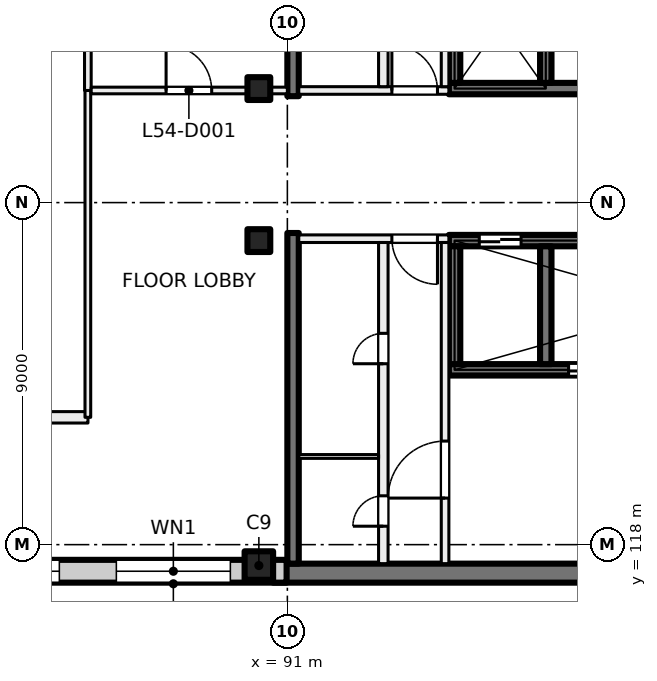
"""IFC4 building model, lengths in metres.
Left out: names, types, materials, properties, quantities, classifications, styles, units other than length and angle.
Written with IfcOpenShell. Run it as: python <this file> out.ifc"""

import sys

from ifc_helpers import new_model, si_unit, direction, frame, frame_2d, origin, origin_2d, place, context, subcontext, project, spatial, rectangle, extrude, element, fill, save


model = new_model("IFC4")
c1 = context("Model", 3, precision=1e-05, world=origin(), true_north=direction((0.0, 1.0)))
c2 = subcontext(c1, "Body", "Model", "MODEL_VIEW")
j1 = project(units=[si_unit("LENGTHUNIT", "METRE"), si_unit("PLANEANGLEUNIT", "RADIAN")], contexts=[c1])
p1 = place(None, origin())
s1 = spatial("IfcSite", under=j1, at=p1, CompositionType="ELEMENT")
p2 = place(p1, origin())
s2 = spatial("IfcBuilding", under=s1, at=p2, CompositionType="ELEMENT")
p3 = place(p2, frame((0.0, 0.0, 228.0)))
s3 = spatial("IfcBuildingStorey", under=s2, at=p3, CompositionType="ELEMENT", Elevation=228.0)
for number, where, z_axis, x_axis in (
    (1, (90.25, 130.0, 0.0), (0.0, 0.0, 1.0), (1.0, 0.0, 0.0)),
    (2, (90.25, 126.0, 0.0), (0.0, 0.0, 1.0), (1.0, 0.0, 0.0)),
):
    element("IfcColumn", number, at=place(p3, frame(where, z_axis=z_axis, x_axis=x_axis)), inside=s3, PredefinedType="COLUMN", context=c2, shape_type="SweptSolid", body=[
        extrude(rectangle(XDim=0.6, YDim=0.6, at=origin_2d()), origin(), (0.0, 0.0, 1.0), 4.0),
    ])
p4 = place(p3, frame((90.25, 117.45, 0.0), z_axis=(0.0, 0.0, 1.0), x_axis=(1.0, 0.0, 0.0)))
e3 = element("IfcColumn", 3, at=p4, inside=s3, PredefinedType="COLUMN", context=c2, shape_type="SweptSolid", body=[
    extrude(rectangle(XDim=0.75, YDim=0.75, at=origin_2d()), origin(), (0.0, 0.0, 1.0), 4.0),
])
p5 = place(p3, frame((99.6, 117.25, 0.0), z_axis=(0.0, 0.0, 1.0), x_axis=(-1.0, 0.0, 0.0)))
e4 = element("IfcWall", 4, at=p5, inside=s3, PredefinedType="SHEAR", context=c2, shape_type="SweptSolid", body=[
    extrude(rectangle(XDim=8.975, YDim=0.5, at=frame_2d((4.488, 0.0))), origin(), (0.0, 0.0, 1.0), 4.0),
])
p6 = place(p3, frame((107.5, 130.0, 0.0), z_axis=(0.0, 0.0, 1.0), x_axis=(-1.0, 0.0, 0.0)))
e5 = element("IfcWall", 5, at=p6, inside=s3, PredefinedType="SHEAR", context=c2, shape_type="SweptSolid", body=[
    extrude(rectangle(XDim=12.25, YDim=0.3, at=frame_2d((6.125, 0.0))), origin(), (0.0, 0.0, 1.0), 4.0),
])
p7 = place(p6, frame((0.9, 0.0, 0.0)))
e6 = element("IfcOpeningElement", 6, at=p7, cuts=e5, PredefinedType="OPENING", context=c2, shape_type="SweptSolid", body=[
    extrude(rectangle(XDim=0.8, YDim=2.1, at=frame_2d((0.4, 1.05))), frame((0.0, 0.16, 0.0), z_axis=(0.0, -1.0, 0.0), x_axis=(1.0, 0.0, 0.0)), (0.0, 0.0, 1.0), 0.32),
])
p8 = place(p6, frame((5.7, 0.0, 0.0)))
e7 = element("IfcOpeningElement", 7, at=p8, cuts=e5, PredefinedType="OPENING", context=c2, shape_type="SweptSolid", body=[
    extrude(rectangle(XDim=0.8, YDim=2.1, at=frame_2d((0.4, 1.05))), frame((0.0, 0.16, 0.0), z_axis=(0.0, -1.0, 0.0), x_axis=(1.0, 0.0, 0.0)), (0.0, 0.0, 1.0), 0.32),
])
for number, where, z_axis, x_axis in (
    (8, (97.8, 133.25, 0.0), (0.0, 0.0, 1.0), (0.0, -1.0, 0.0)),
    (9, (95.4, 133.25, 0.0), (0.0, 0.0, 1.0), (0.0, -1.0, 0.0)),
):
    element("IfcWall", number, at=place(p3, frame(where, z_axis=z_axis, x_axis=x_axis)), inside=s3, PredefinedType="SHEAR", context=c2, shape_type="SweptSolid", body=[
        extrude(rectangle(XDim=3.1, YDim=0.3, at=frame_2d((1.55, 0.0))), origin(), (0.0, 0.0, 1.0), 4.0),
    ])
p9 = place(p3, frame((107.5, 126.0, 0.0), z_axis=(0.0, 0.0, 1.0), x_axis=(-1.0, 0.0, 0.0)))
e10 = element("IfcWall", 10, at=p9, inside=s3, PredefinedType="SHEAR", context=c2, shape_type="SweptSolid", body=[
    extrude(rectangle(XDim=12.25, YDim=0.3, at=frame_2d((6.125, 0.0))), origin(), (0.0, 0.0, 1.0), 4.0),
])
p10 = place(p9, frame((0.75, 0.0, 0.0)))
e11 = element("IfcOpeningElement", 11, at=p10, cuts=e10, PredefinedType="OPENING", context=c2, shape_type="SweptSolid", body=[
    extrude(rectangle(XDim=1.1, YDim=2.1, at=frame_2d((0.55, 1.05))), frame((0.0, 0.16, 0.0), z_axis=(0.0, -1.0, 0.0), x_axis=(1.0, 0.0, 0.0)), (0.0, 0.0, 1.0), 0.32),
])
p11 = place(p9, frame((3.15, 0.0, 0.0)))
e12 = element("IfcOpeningElement", 12, at=p11, cuts=e10, PredefinedType="OPENING", context=c2, shape_type="SweptSolid", body=[
    extrude(rectangle(XDim=1.1, YDim=2.1, at=frame_2d((0.55, 1.05))), frame((0.0, 0.16, 0.0), z_axis=(0.0, -1.0, 0.0), x_axis=(1.0, 0.0, 0.0)), (0.0, 0.0, 1.0), 0.32),
])
p12 = place(p9, frame((5.55, 0.0, 0.0)))
e13 = element("IfcOpeningElement", 13, at=p12, cuts=e10, PredefinedType="OPENING", context=c2, shape_type="SweptSolid", body=[
    extrude(rectangle(XDim=1.1, YDim=2.1, at=frame_2d((0.55, 1.05))), frame((0.0, 0.16, 0.0), z_axis=(0.0, -1.0, 0.0), x_axis=(1.0, 0.0, 0.0)), (0.0, 0.0, 1.0), 0.32),
])
p13 = place(p9, frame((10.35, 0.0, 0.0)))
e14 = element("IfcOpeningElement", 14, at=p13, cuts=e10, PredefinedType="OPENING", context=c2, shape_type="SweptSolid", body=[
    extrude(rectangle(XDim=1.1, YDim=2.1, at=frame_2d((0.55, 1.05))), frame((0.0, 0.16, 0.0), z_axis=(0.0, -1.0, 0.0), x_axis=(1.0, 0.0, 0.0)), (0.0, 0.0, 1.0), 0.32),
])
p14 = place(p3, frame((107.5, 122.6, 0.0), z_axis=(0.0, 0.0, 1.0), x_axis=(-1.0, 0.0, 0.0)))
e15 = element("IfcWall", 15, at=p14, inside=s3, PredefinedType="SHEAR", context=c2, shape_type="SweptSolid", body=[
    extrude(rectangle(XDim=12.25, YDim=0.3, at=frame_2d((6.125, 0.0))), origin(), (0.0, 0.0, 1.0), 4.0),
])
p15 = place(p14, frame((8.0, 0.0, 0.0)))
e16 = element("IfcOpeningElement", 16, at=p15, cuts=e15, PredefinedType="OPENING", context=c2, shape_type="SweptSolid", body=[
    extrude(rectangle(XDim=1.1, YDim=2.1, at=frame_2d((0.55, 1.05))), frame((0.0, 0.16, 0.0), z_axis=(0.0, -1.0, 0.0), x_axis=(1.0, 0.0, 0.0)), (0.0, 0.0, 1.0), 0.32),
])
for number, where, z_axis, x_axis in (
    (17, (97.8, 125.85, 0.0), (0.0, 0.0, 1.0), (0.0, -1.0, 0.0)),
    (18, (95.4, 125.85, 0.0), (0.0, 0.0, 1.0), (0.0, -1.0, 0.0)),
):
    element("IfcWall", number, at=place(p3, frame(where, z_axis=z_axis, x_axis=x_axis)), inside=s3, PredefinedType="SHEAR", context=c2, shape_type="SweptSolid", body=[
        extrude(rectangle(XDim=3.1, YDim=0.3, at=frame_2d((1.55, 0.0))), origin(), (0.0, 0.0, 1.0), 4.0),
    ])
for number, where, z_axis, x_axis in (
    (19, (91.15, 138.5, 0.0), (0.0, 0.0, 1.0), (0.0, -1.0, 0.0)),
    (20, (91.15, 126.2, 0.0), (0.0, 0.0, 1.0), (0.0, -1.0, 0.0)),
):
    element("IfcWall", number, at=place(p3, frame(where, z_axis=z_axis, x_axis=x_axis)), inside=s3, PredefinedType="SHEAR", context=c2, shape_type="SweptSolid", body=[
        extrude(rectangle(XDim=8.7, YDim=0.3, at=frame_2d((4.35, 0.0))), origin(), (0.0, 0.0, 1.0), 4.0),
    ])
p16 = place(p3, frame((90.98, 117.3, 0.0), z_axis=(0.0, 0.0, 1.0), x_axis=(-1.0, 0.0, 0.0)))
e21 = element("IfcWall", 21, at=p16, inside=s3, PredefinedType="SOLIDWALL", context=c2, shape_type="SweptSolid", body=[
    extrude(rectangle(XDim=33.745, YDim=0.6, at=frame_2d((16.873, 0.0))), origin(), (0.0, 0.0, 1.0), 3.625),
])
p17 = place(p16, frame((1.48, 0.0, 0.9)))
e22 = element("IfcOpeningElement", 22, at=p17, cuts=e21, PredefinedType="OPENING", context=c2, shape_type="SweptSolid", body=[
    extrude(rectangle(XDim=3.0, YDim=2.4, at=frame_2d((1.5, 1.2))), frame((0.0, 0.31, 0.0), z_axis=(0.0, -1.0, 0.0), x_axis=(1.0, 0.0, 0.0)), (0.0, 0.0, 1.0), 0.62),
])
p18 = place(p16, frame((5.98, 0.0, 0.9)))
e23 = element("IfcOpeningElement", 23, at=p18, cuts=e21, PredefinedType="OPENING", context=c2, shape_type="SweptSolid", body=[
    extrude(rectangle(XDim=3.0, YDim=2.4, at=frame_2d((1.5, 1.2))), frame((0.0, 0.31, 0.0), z_axis=(0.0, -1.0, 0.0), x_axis=(1.0, 0.0, 0.0)), (0.0, 0.0, 1.0), 0.62),
])
p19 = place(p16, frame((10.48, 0.0, 0.9)))
e24 = element("IfcOpeningElement", 24, at=p19, cuts=e21, PredefinedType="OPENING", context=c2, shape_type="SweptSolid", body=[
    extrude(rectangle(XDim=3.0, YDim=2.4, at=frame_2d((1.5, 1.2))), frame((0.0, 0.31, 0.0), z_axis=(0.0, -1.0, 0.0), x_axis=(1.0, 0.0, 0.0)), (0.0, 0.0, 1.0), 0.62),
])
p20 = place(p16, frame((14.98, 0.0, 0.9)))
e25 = element("IfcOpeningElement", 25, at=p20, cuts=e21, PredefinedType="OPENING", context=c2, shape_type="SweptSolid", body=[
    extrude(rectangle(XDim=3.0, YDim=2.4, at=frame_2d((1.5, 1.2))), frame((0.0, 0.31, 0.0), z_axis=(0.0, -1.0, 0.0), x_axis=(1.0, 0.0, 0.0)), (0.0, 0.0, 1.0), 0.62),
])
p21 = place(p16, frame((19.48, 0.0, 0.9)))
e26 = element("IfcOpeningElement", 26, at=p21, cuts=e21, PredefinedType="OPENING", context=c2, shape_type="SweptSolid", body=[
    extrude(rectangle(XDim=3.0, YDim=2.4, at=frame_2d((1.5, 1.2))), frame((0.0, 0.31, 0.0), z_axis=(0.0, -1.0, 0.0), x_axis=(1.0, 0.0, 0.0)), (0.0, 0.0, 1.0), 0.62),
])
p22 = place(p16, frame((24.58, 0.0, 0.0)))
e27 = element("IfcOpeningElement", 27, at=p22, cuts=e21, PredefinedType="OPENING", context=c2, shape_type="SweptSolid", body=[
    extrude(rectangle(XDim=1.8, YDim=2.4, at=frame_2d((0.9, 1.2))), frame((0.0, 0.31, 0.0), z_axis=(0.0, -1.0, 0.0), x_axis=(1.0, 0.0, 0.0)), (0.0, 0.0, 1.0), 0.62),
])
p23 = place(p16, frame((28.48, 0.0, 0.9)))
e28 = element("IfcOpeningElement", 28, at=p23, cuts=e21, PredefinedType="OPENING", context=c2, shape_type="SweptSolid", body=[
    extrude(rectangle(XDim=3.0, YDim=2.4, at=frame_2d((1.5, 1.2))), frame((0.0, 0.31, 0.0), z_axis=(0.0, -1.0, 0.0), x_axis=(1.0, 0.0, 0.0)), (0.0, 0.0, 1.0), 0.62),
])
p24 = place(p3, frame((95.25, 126.05, 0.0), z_axis=(0.0, 0.0, 1.0), x_axis=(-1.0, 0.0, 0.0)))
e29 = element("IfcWall", 29, at=p24, inside=s3, PredefinedType="PARTITIONING", context=c2, shape_type="SweptSolid", body=[
    extrude(rectangle(XDim=3.95, YDim=0.2, at=frame_2d((1.975, 0.0))), origin(), (0.0, 0.0, 1.0), 3.625),
])
p25 = place(p24, frame((0.3, 0.0, 0.0)))
e30 = element("IfcOpeningElement", 30, at=p25, cuts=e29, PredefinedType="OPENING", context=c2, shape_type="SweptSolid", body=[
    extrude(rectangle(XDim=1.2, YDim=2.1, at=frame_2d((0.6, 1.05))), frame((0.0, 0.11, 0.0), z_axis=(0.0, -1.0, 0.0), x_axis=(1.0, 0.0, 0.0)), (0.0, 0.0, 1.0), 0.22),
])
p26 = place(p3, frame((95.15, 117.5, 0.0), z_axis=(0.0, 0.0, 1.0), x_axis=(0.0, 1.0, 0.0)))
e31 = element("IfcWall", 31, at=p26, inside=s3, PredefinedType="PARTITIONING", context=c2, shape_type="SweptSolid", body=[
    extrude(rectangle(XDim=8.45, YDim=0.2, at=frame_2d((4.225, 0.0))), origin(), (0.0, 0.0, 1.0), 3.625),
])
p27 = place(p26, frame((1.725, 0.0, 0.0)))
e32 = element("IfcOpeningElement", 32, at=p27, cuts=e31, PredefinedType="OPENING", context=c2, shape_type="SweptSolid", body=[
    extrude(rectangle(XDim=1.5, YDim=2.1, at=frame_2d((0.75, 1.05))), frame((0.0, 0.11, 0.0), z_axis=(0.0, -1.0, 0.0), x_axis=(1.0, 0.0, 0.0)), (0.0, 0.0, 1.0), 0.22),
])
p28 = place(p3, frame((93.525, 117.5, 0.0), z_axis=(0.0, 0.0, 1.0), x_axis=(0.0, 1.0, 0.0)))
e33 = element("IfcWall", 33, at=p28, inside=s3, PredefinedType="PARTITIONING", context=c2, shape_type="SweptSolid", body=[
    extrude(rectangle(XDim=8.45, YDim=0.25, at=frame_2d((4.225, 0.0))), origin(), (0.0, 0.0, 1.0), 3.625),
])
p29 = place(p28, frame((5.26, 0.0, 0.0)))
e34 = element("IfcOpeningElement", 34, at=p29, cuts=e33, PredefinedType="OPENING", context=c2, shape_type="SweptSolid", body=[
    extrude(rectangle(XDim=0.8, YDim=2.1, at=frame_2d((0.4, 1.05))), frame((0.0, 0.135, 0.0), z_axis=(0.0, -1.0, 0.0), x_axis=(1.0, 0.0, 0.0)), (0.0, 0.0, 1.0), 0.27),
])
p30 = place(p28, frame((0.985, 0.0, 0.0)))
e35 = element("IfcOpeningElement", 35, at=p30, cuts=e33, PredefinedType="OPENING", context=c2, shape_type="SweptSolid", body=[
    extrude(rectangle(XDim=0.8, YDim=2.1, at=frame_2d((0.4, 1.05))), frame((0.0, 0.135, 0.0), z_axis=(0.0, -1.0, 0.0), x_axis=(1.0, 0.0, 0.0)), (0.0, 0.0, 1.0), 0.27),
])
p31 = place(p3, frame((93.4, 120.32, 0.0), z_axis=(0.0, 0.0, 1.0), x_axis=(-1.0, 0.0, 0.0)))
e36 = element("IfcWall", 36, at=p31, inside=s3, PredefinedType="PARTITIONING", context=c2, shape_type="SweptSolid", body=[
    extrude(rectangle(XDim=2.1, YDim=0.1, at=frame_2d((1.05, 0.0))), origin(), (0.0, 0.0, 1.0), 3.625),
])
p32 = place(p3, frame((91.3, 129.95, 0.0), z_axis=(0.0, 0.0, 1.0), x_axis=(1.0, 0.0, 0.0)))
e37 = element("IfcWall", 37, at=p32, inside=s3, PredefinedType="PARTITIONING", context=c2, shape_type="SweptSolid", body=[
    extrude(rectangle(XDim=3.95, YDim=0.2, at=frame_2d((1.975, 0.0))), origin(), (0.0, 0.0, 1.0), 3.625),
])
p33 = place(p32, frame((2.45, 0.0, 0.0)))
e38 = element("IfcOpeningElement", 38, at=p33, cuts=e37, PredefinedType="OPENING", context=c2, shape_type="SweptSolid", body=[
    extrude(rectangle(XDim=1.2, YDim=2.1, at=frame_2d((0.6, 1.05))), frame((0.0, 0.11, 0.0), z_axis=(0.0, -1.0, 0.0), x_axis=(1.0, 0.0, 0.0)), (0.0, 0.0, 1.0), 0.22),
])
p34 = place(p3, frame((95.15, 130.05, 0.0), z_axis=(0.0, 0.0, 1.0), x_axis=(0.0, 1.0, 0.0)))
e39 = element("IfcWall", 39, at=p34, inside=s3, PredefinedType="PARTITIONING", context=c2, shape_type="SweptSolid", body=[
    extrude(rectangle(XDim=8.45, YDim=0.2, at=frame_2d((4.225, 0.0))), origin(), (0.0, 0.0, 1.0), 3.625),
])
p35 = place(p34, frame((5.225, 0.0, 0.0)))
e40 = element("IfcOpeningElement", 40, at=p35, cuts=e39, PredefinedType="OPENING", context=c2, shape_type="SweptSolid", body=[
    extrude(rectangle(XDim=1.5, YDim=2.1, at=frame_2d((0.75, 1.05))), frame((0.0, 0.11, 0.0), z_axis=(0.0, -1.0, 0.0), x_axis=(1.0, 0.0, 0.0)), (0.0, 0.0, 1.0), 0.22),
])
p36 = place(p3, frame((93.525, 130.05, 0.0), z_axis=(0.0, 0.0, 1.0), x_axis=(0.0, 1.0, 0.0)))
e41 = element("IfcWall", 41, at=p36, inside=s3, PredefinedType="PARTITIONING", context=c2, shape_type="SweptSolid", body=[
    extrude(rectangle(XDim=8.45, YDim=0.25, at=frame_2d((4.225, 0.0))), origin(), (0.0, 0.0, 1.0), 3.625),
])
p37 = place(p36, frame((1.69, 0.0, 0.0)))
e42 = element("IfcOpeningElement", 42, at=p37, cuts=e41, PredefinedType="OPENING", context=c2, shape_type="SweptSolid", body=[
    extrude(rectangle(XDim=0.8, YDim=2.1, at=frame_2d((0.4, 1.05))), frame((0.0, 0.135, 0.0), z_axis=(0.0, -1.0, 0.0), x_axis=(1.0, 0.0, 0.0)), (0.0, 0.0, 1.0), 0.27),
])
p38 = place(p36, frame((5.965, 0.0, 0.0)))
e43 = element("IfcOpeningElement", 43, at=p38, cuts=e41, PredefinedType="OPENING", context=c2, shape_type="SweptSolid", body=[
    extrude(rectangle(XDim=0.8, YDim=2.1, at=frame_2d((0.4, 1.05))), frame((0.0, 0.135, 0.0), z_axis=(0.0, -1.0, 0.0), x_axis=(1.0, 0.0, 0.0)), (0.0, 0.0, 1.0), 0.27),
])
p39 = place(p3, frame((50.657, 121.35, 0.0), z_axis=(0.0, 0.0, 1.0), x_axis=(1.0, 0.0, 0.0)))
e44 = element("IfcWall", 44, at=p39, inside=s3, PredefinedType="PARTITIONING", context=c2, shape_type="SweptSolid", body=[
    extrude(rectangle(XDim=35.096, YDim=0.3, at=frame_2d((17.548, 0.0))), origin(), (0.0, 0.0, 1.0), 3.625),
])
p40 = place(p39, frame((27.093, 0.0, 0.0)))
e45 = element("IfcOpeningElement", 45, at=p40, cuts=e44, PredefinedType="OPENING", context=c2, shape_type="SweptSolid", body=[
    extrude(rectangle(XDim=1.0, YDim=2.1, at=frame_2d((0.5, 1.05))), frame((0.0, 0.16, 0.0), z_axis=(0.0, -1.0, 0.0), x_axis=(1.0, 0.0, 0.0)), (0.0, 0.0, 1.0), 0.32),
])
p41 = place(p39, frame((23.243, 0.0, 0.0)))
e46 = element("IfcOpeningElement", 46, at=p41, cuts=e44, PredefinedType="OPENING", context=c2, shape_type="SweptSolid", body=[
    extrude(rectangle(XDim=1.2, YDim=2.1, at=frame_2d((0.6, 1.05))), frame((0.0, 0.16, 0.0), z_axis=(0.0, -1.0, 0.0), x_axis=(1.0, 0.0, 0.0)), (0.0, 0.0, 1.0), 0.32),
])
p42 = place(p39, frame((31.943, 0.0, 0.0)))
e47 = element("IfcOpeningElement", 47, at=p42, cuts=e44, PredefinedType="OPENING", context=c2, shape_type="SweptSolid", body=[
    extrude(rectangle(XDim=1.8, YDim=2.1, at=frame_2d((0.9, 1.05))), frame((0.0, 0.16, 0.0), z_axis=(0.0, -1.0, 0.0), x_axis=(1.0, 0.0, 0.0)), (0.0, 0.0, 1.0), 0.32),
])
p43 = place(p39, frame((16.593, 0.0, 0.0)))
e48 = element("IfcOpeningElement", 48, at=p43, cuts=e44, PredefinedType="OPENING", context=c2, shape_type="SweptSolid", body=[
    extrude(rectangle(XDim=1.0, YDim=2.1, at=frame_2d((0.5, 1.05))), frame((0.0, 0.16, 0.0), z_axis=(0.0, -1.0, 0.0), x_axis=(1.0, 0.0, 0.0)), (0.0, 0.0, 1.0), 0.32),
])
p44 = place(p39, frame((7.193, 0.0, 0.0)))
e49 = element("IfcOpeningElement", 49, at=p44, cuts=e44, PredefinedType="OPENING", context=c2, shape_type="SweptSolid", body=[
    extrude(rectangle(XDim=1.8, YDim=2.1, at=frame_2d((0.9, 1.05))), frame((0.0, 0.16, 0.0), z_axis=(0.0, -1.0, 0.0), x_axis=(1.0, 0.0, 0.0)), (0.0, 0.0, 1.0), 0.32),
])
p45 = place(p39, frame((0.896, 0.0, 0.0)))
e50 = element("IfcOpeningElement", 50, at=p45, cuts=e44, PredefinedType="OPENING", context=c2, shape_type="SweptSolid", body=[
    extrude(rectangle(XDim=1.8, YDim=2.1, at=frame_2d((0.9, 1.05))), frame((0.0, 0.16, 0.0), z_axis=(0.0, -1.0, 0.0), x_axis=(1.0, 0.0, 0.0)), (0.0, 0.0, 1.0), 0.32),
])
p46 = place(p3, frame((85.75, 121.35, 0.0), z_axis=(0.0, 0.0, 1.0), x_axis=(0.0, 1.0, 0.0)))
e51 = element("IfcWall", 51, at=p46, inside=s3, PredefinedType="PARTITIONING", context=c2, shape_type="SweptSolid", body=[
    extrude(rectangle(XDim=8.6, YDim=0.15, at=frame_2d((4.3, 0.0))), origin(), (0.0, 0.0, 1.0), 3.625),
])
p47 = place(p3, frame((85.75, 129.95, 0.0), z_axis=(0.0, 0.0, 1.0), x_axis=(0.0, 1.0, 0.0)))
e52 = element("IfcWall", 52, at=p47, inside=s3, PredefinedType="PARTITIONING", context=c2, shape_type="SweptSolid", body=[
    extrude(rectangle(XDim=8.45, YDim=0.175, at=frame_2d((4.225, 0.0))), origin(), (0.0, 0.0, 1.0), 3.625),
])
p48 = place(p3, frame((85.838, 129.95, 0.0), z_axis=(0.0, 0.0, 1.0), x_axis=(1.0, 0.0, 0.0)))
e53 = element("IfcWall", 53, at=p48, inside=s3, PredefinedType="PARTITIONING", context=c2, shape_type="SweptSolid", body=[
    extrude(rectangle(XDim=5.162, YDim=0.175, at=frame_2d((2.581, 0.0))), origin(), (0.0, 0.0, 1.0), 3.625),
])
p49 = place(p48, frame((1.971, 0.0, 0.0)))
e54 = element("IfcOpeningElement", 54, at=p49, cuts=e53, PredefinedType="OPENING", context=c2, shape_type="SweptSolid", body=[
    extrude(rectangle(XDim=1.2, YDim=2.1, at=frame_2d((0.6, 1.05))), frame((0.0, 0.097, 0.0), z_axis=(0.0, -1.0, 0.0), x_axis=(1.0, 0.0, 0.0)), (0.0, 0.0, 1.0), 0.195),
])
p50 = place(p17, origin())
e55 = element("IfcWindow", 55, at=p50, inside=s3, PartitioningType="SINGLE_PANEL", PredefinedType="WINDOW", context=c2, shape_type="SweptSolid", body=[
    extrude(rectangle(XDim=3.0, YDim=2.4, at=frame_2d((1.5, 1.2))), frame((0.0, 0.03, 0.0), z_axis=(0.0, -1.0, 0.0), x_axis=(1.0, 0.0, 0.0)), (0.0, 0.0, 1.0), 0.06),
])
fill(e22, e55)
p51 = place(p18, origin())
e56 = element("IfcWindow", 56, at=p51, inside=s3, PartitioningType="SINGLE_PANEL", PredefinedType="WINDOW", context=c2, shape_type="SweptSolid", body=[
    extrude(rectangle(XDim=3.0, YDim=2.4, at=frame_2d((1.5, 1.2))), frame((0.0, 0.03, 0.0), z_axis=(0.0, -1.0, 0.0), x_axis=(1.0, 0.0, 0.0)), (0.0, 0.0, 1.0), 0.06),
])
fill(e23, e56)
p52 = place(p13, origin())
e57 = element("IfcDoor", 57, at=p52, inside=s3, OperationType="DOUBLE_DOOR_SLIDING", PredefinedType="DOOR", context=c2, shape_type="SweptSolid", body=[
    extrude(rectangle(XDim=1.1, YDim=2.1, at=frame_2d((0.55, 1.05))), frame((0.0, 0.025, 0.0), z_axis=(0.0, -1.0, 0.0), x_axis=(1.0, 0.0, 0.0)), (0.0, 0.0, 1.0), 0.05),
])
fill(e14, e57)
p53 = place(p25, origin())
e58 = element("IfcDoor", 58, at=p53, inside=s3, OperationType="DOUBLE_DOOR_SINGLE_SWING", PredefinedType="DOOR", context=c2, shape_type="SweptSolid", body=[
    extrude(rectangle(XDim=1.2, YDim=2.1, at=frame_2d((0.6, 1.05))), frame((0.0, 0.025, 0.0), z_axis=(0.0, -1.0, 0.0), x_axis=(1.0, 0.0, 0.0)), (0.0, 0.0, 1.0), 0.05),
])
fill(e30, e58)
p54 = place(p27, origin())
e59 = element("IfcDoor", 59, at=p54, inside=s3, OperationType="DOUBLE_DOOR_SINGLE_SWING", PredefinedType="DOOR", context=c2, shape_type="SweptSolid", body=[
    extrude(rectangle(XDim=1.5, YDim=2.1, at=frame_2d((0.75, 1.05))), frame((0.0, 0.025, 0.0), z_axis=(0.0, -1.0, 0.0), x_axis=(1.0, 0.0, 0.0)), (0.0, 0.0, 1.0), 0.05),
])
fill(e32, e59)
p55 = place(p29, origin())
e60 = element("IfcDoor", 60, at=p55, inside=s3, OperationType="SINGLE_SWING_LEFT", PredefinedType="DOOR", context=c2, shape_type="SweptSolid", body=[
    extrude(rectangle(XDim=0.8, YDim=2.1, at=frame_2d((0.4, 1.05))), frame((0.0, 0.025, 0.0), z_axis=(0.0, -1.0, 0.0), x_axis=(1.0, 0.0, 0.0)), (0.0, 0.0, 1.0), 0.05),
])
fill(e34, e60)
p56 = place(p30, origin())
e61 = element("IfcDoor", 61, at=p56, inside=s3, OperationType="SINGLE_SWING_RIGHT", PredefinedType="DOOR", context=c2, shape_type="SweptSolid", body=[
    extrude(rectangle(XDim=0.8, YDim=2.1, at=frame_2d((0.4, 1.05))), frame((0.0, 0.025, 0.0), z_axis=(0.0, -1.0, 0.0), x_axis=(1.0, 0.0, 0.0)), (0.0, 0.0, 1.0), 0.05),
])
fill(e35, e61)
p57 = place(p33, origin())
e62 = element("IfcDoor", 62, at=p57, inside=s3, OperationType="DOUBLE_DOOR_SINGLE_SWING", PredefinedType="DOOR", context=c2, shape_type="SweptSolid", body=[
    extrude(rectangle(XDim=1.2, YDim=2.1, at=frame_2d((0.6, 1.05))), frame((0.0, 0.025, 0.0), z_axis=(0.0, -1.0, 0.0), x_axis=(1.0, 0.0, 0.0)), (0.0, 0.0, 1.0), 0.05),
])
fill(e38, e62)
p58 = place(p15, origin())
e63 = element("IfcDoor", 63, at=p58, inside=s3, OperationType="DOUBLE_DOOR_SLIDING", PredefinedType="DOOR", context=c2, shape_type="SweptSolid", body=[
    extrude(rectangle(XDim=1.1, YDim=2.1, at=frame_2d((0.55, 1.05))), frame((0.0, 0.025, 0.0), z_axis=(0.0, -1.0, 0.0), x_axis=(1.0, 0.0, 0.0)), (0.0, 0.0, 1.0), 0.05),
])
fill(e16, e63)
p59 = place(p49, origin())
e64 = element("IfcDoor", 64, at=p59, inside=s3, OperationType="DOUBLE_DOOR_SINGLE_SWING", PredefinedType="DOOR", context=c2, shape_type="SweptSolid", body=[
    extrude(rectangle(XDim=1.2, YDim=2.1, at=frame_2d((0.6, 1.05))), frame((0.0, 0.025, 0.0), z_axis=(0.0, -1.0, 0.0), x_axis=(1.0, 0.0, 0.0)), (0.0, 0.0, 1.0), 0.05),
])
fill(e54, e64)
save(model, sys.argv[1])
